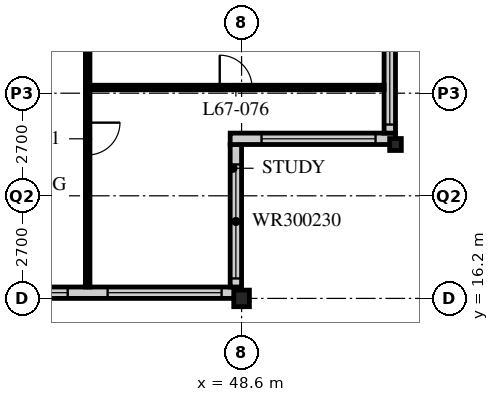
"""IFC4 building model, lengths in metres.
Left out: names, types, materials, properties, quantities, classifications, styles, units other than length and angle.
Written with IfcOpenShell. Run it as: python <this file> out.ifc"""

import sys

from ifc_helpers import new_model, si_unit, direction, frame, frame_2d, origin, origin_2d, place, context, subcontext, project, spatial, rectangle, i_section, extrude, element, fill, save


model = new_model("IFC4")
c1 = context("Model", 3, precision=1e-05, world=origin(), true_north=direction((0.0, 1.0)))
c2 = subcontext(c1, "Body", "Model", "MODEL_VIEW")
j1 = project(units=[si_unit("LENGTHUNIT", "METRE"), si_unit("PLANEANGLEUNIT", "RADIAN")], contexts=[c1])
p1 = place(None, origin())
s1 = spatial("IfcSite", under=j1, at=p1, CompositionType="ELEMENT")
p2 = place(p1, origin())
s2 = spatial("IfcBuilding", under=s1, at=p2, CompositionType="ELEMENT")
p3 = place(p2, frame((0.0, 0.0, 261.9)))
s3 = spatial("IfcBuildingStorey", under=s2, at=p3, CompositionType="ELEMENT", Elevation=261.9)
p4 = place(p3, frame((48.6, 16.2, 0.0), z_axis=(0.0, 0.0, 1.0), x_axis=(1.0, 0.0, 0.0)))
e1 = element("IfcColumn", 1, at=p4, inside=s3, PredefinedType="COLUMN", context=c2, shape_type="SweptSolid", body=[
    extrude(i_section(OverallWidth=0.412, OverallDepth=0.437, WebThickness=0.036, FlangeThickness=0.058, FilletRadius=0.015, at=origin_2d()), origin(), (0.0, 0.0, 1.0), 3.9),
])
p5 = place(p3, frame((52.65, 20.25, 0.0), z_axis=(0.0, 0.0, 1.0), x_axis=(1.0, 0.0, 0.0)))
e2 = element("IfcColumn", 2, at=p5, inside=s3, PredefinedType="COLUMN", context=c2, shape_type="SweptSolid", body=[
    extrude(i_section(OverallWidth=0.307, OverallDepth=0.314, WebThickness=0.012, FlangeThickness=0.019, FilletRadius=0.015, at=origin_2d()), origin(), (0.0, 0.0, 1.0), 3.9),
])
p6 = place(p3, frame((8.4, 16.35, 0.0), z_axis=(0.0, 0.0, 1.0), x_axis=(1.0, 0.0, 0.0)))
e3 = element("IfcWall", 3, at=p6, inside=s3, PredefinedType="SOLIDWALL", context=c2, shape_type="SweptSolid", body=[
    extrude(rectangle(XDim=40.2, YDim=0.3, at=frame_2d((20.1, 0.0))), origin(), (0.0, 0.0, 1.0), 3.69),
])
p7 = place(p6, frame((0.225, 0.0, 0.6)))
e4 = element("IfcOpeningElement", 4, at=p7, cuts=e3, PredefinedType="OPENING", context=c2, shape_type="SweptSolid", body=[
    extrude(rectangle(XDim=3.0, YDim=2.4, at=frame_2d((1.5, 1.2))), frame((0.0, 0.16, 0.0), z_axis=(0.0, -1.0, 0.0), x_axis=(1.0, 0.0, 0.0)), (0.0, 0.0, 1.0), 0.32),
])
p8 = place(p6, frame((4.275, 0.0, 0.6)))
e5 = element("IfcOpeningElement", 5, at=p8, cuts=e3, PredefinedType="OPENING", context=c2, shape_type="SweptSolid", body=[
    extrude(rectangle(XDim=3.0, YDim=2.4, at=frame_2d((1.5, 1.2))), frame((0.0, 0.16, 0.0), z_axis=(0.0, -1.0, 0.0), x_axis=(1.0, 0.0, 0.0)), (0.0, 0.0, 1.0), 0.32),
])
p9 = place(p6, frame((8.325, 0.0, 0.6)))
e6 = element("IfcOpeningElement", 6, at=p9, cuts=e3, PredefinedType="OPENING", context=c2, shape_type="SweptSolid", body=[
    extrude(rectangle(XDim=3.0, YDim=2.4, at=frame_2d((1.5, 1.2))), frame((0.0, 0.16, 0.0), z_axis=(0.0, -1.0, 0.0), x_axis=(1.0, 0.0, 0.0)), (0.0, 0.0, 1.0), 0.32),
])
p10 = place(p6, frame((12.375, 0.0, 0.6)))
e7 = element("IfcOpeningElement", 7, at=p10, cuts=e3, PredefinedType="OPENING", context=c2, shape_type="SweptSolid", body=[
    extrude(rectangle(XDim=3.0, YDim=2.4, at=frame_2d((1.5, 1.2))), frame((0.0, 0.16, 0.0), z_axis=(0.0, -1.0, 0.0), x_axis=(1.0, 0.0, 0.0)), (0.0, 0.0, 1.0), 0.32),
])
p11 = place(p6, frame((16.425, 0.0, 0.6)))
e8 = element("IfcOpeningElement", 8, at=p11, cuts=e3, PredefinedType="OPENING", context=c2, shape_type="SweptSolid", body=[
    extrude(rectangle(XDim=3.0, YDim=2.4, at=frame_2d((1.5, 1.2))), frame((0.0, 0.16, 0.0), z_axis=(0.0, -1.0, 0.0), x_axis=(1.0, 0.0, 0.0)), (0.0, 0.0, 1.0), 0.32),
])
p12 = place(p6, frame((20.475, 0.0, 0.6)))
e9 = element("IfcOpeningElement", 9, at=p12, cuts=e3, PredefinedType="OPENING", context=c2, shape_type="SweptSolid", body=[
    extrude(rectangle(XDim=3.0, YDim=2.4, at=frame_2d((1.5, 1.2))), frame((0.0, 0.16, 0.0), z_axis=(0.0, -1.0, 0.0), x_axis=(1.0, 0.0, 0.0)), (0.0, 0.0, 1.0), 0.32),
])
p13 = place(p6, frame((24.525, 0.0, 0.6)))
e10 = element("IfcOpeningElement", 10, at=p13, cuts=e3, PredefinedType="OPENING", context=c2, shape_type="SweptSolid", body=[
    extrude(rectangle(XDim=3.0, YDim=2.4, at=frame_2d((1.5, 1.2))), frame((0.0, 0.16, 0.0), z_axis=(0.0, -1.0, 0.0), x_axis=(1.0, 0.0, 0.0)), (0.0, 0.0, 1.0), 0.32),
])
p14 = place(p6, frame((28.575, 0.0, 0.6)))
e11 = element("IfcOpeningElement", 11, at=p14, cuts=e3, PredefinedType="OPENING", context=c2, shape_type="SweptSolid", body=[
    extrude(rectangle(XDim=3.0, YDim=2.4, at=frame_2d((1.5, 1.2))), frame((0.0, 0.16, 0.0), z_axis=(0.0, -1.0, 0.0), x_axis=(1.0, 0.0, 0.0)), (0.0, 0.0, 1.0), 0.32),
])
p15 = place(p6, frame((32.625, 0.0, 0.6)))
e12 = element("IfcOpeningElement", 12, at=p15, cuts=e3, PredefinedType="OPENING", context=c2, shape_type="SweptSolid", body=[
    extrude(rectangle(XDim=3.0, YDim=2.4, at=frame_2d((1.5, 1.2))), frame((0.0, 0.16, 0.0), z_axis=(0.0, -1.0, 0.0), x_axis=(1.0, 0.0, 0.0)), (0.0, 0.0, 1.0), 0.32),
])
p16 = place(p6, frame((36.675, 0.0, 0.6)))
e13 = element("IfcOpeningElement", 13, at=p16, cuts=e3, PredefinedType="OPENING", context=c2, shape_type="SweptSolid", body=[
    extrude(rectangle(XDim=3.0, YDim=2.4, at=frame_2d((1.5, 1.2))), frame((0.0, 0.16, 0.0), z_axis=(0.0, -1.0, 0.0), x_axis=(1.0, 0.0, 0.0)), (0.0, 0.0, 1.0), 0.32),
])
p17 = place(p3, frame((48.45, 16.5, 0.0), z_axis=(0.0, 0.0, 1.0), x_axis=(0.0, 1.0, 0.0)))
e14 = element("IfcWall", 14, at=p17, inside=s3, PredefinedType="SOLIDWALL", context=c2, shape_type="SweptSolid", body=[
    extrude(rectangle(XDim=3.75, YDim=0.3, at=frame_2d((1.875, 0.0))), origin(), (0.0, 0.0, 1.0), 3.69),
])
p18 = place(p17, frame((0.225, 0.0, 0.6)))
e15 = element("IfcOpeningElement", 15, at=p18, cuts=e14, PredefinedType="OPENING", context=c2, shape_type="SweptSolid", body=[
    extrude(rectangle(XDim=3.0, YDim=2.3, at=frame_2d((1.5, 1.15))), frame((0.0, 0.16, 0.0), z_axis=(0.0, -1.0, 0.0), x_axis=(1.0, 0.0, 0.0)), (0.0, 0.0, 1.0), 0.32),
])
p19 = place(p3, frame((48.3, 20.4, 0.0), z_axis=(0.0, 0.0, 1.0), x_axis=(1.0, 0.0, 0.0)))
e16 = element("IfcWall", 16, at=p19, inside=s3, PredefinedType="SOLIDWALL", context=c2, shape_type="SweptSolid", body=[
    extrude(rectangle(XDim=4.35, YDim=0.3, at=frame_2d((2.175, 0.0))), origin(), (0.0, 0.0, 1.0), 3.69),
])
p20 = place(p19, frame((0.825, 0.0, 0.6)))
e17 = element("IfcOpeningElement", 17, at=p20, cuts=e16, PredefinedType="OPENING", context=c2, shape_type="SweptSolid", body=[
    extrude(rectangle(XDim=3.0, YDim=2.3, at=frame_2d((1.5, 1.15))), frame((0.0, 0.16, 0.0), z_axis=(0.0, -1.0, 0.0), x_axis=(1.0, 0.0, 0.0)), (0.0, 0.0, 1.0), 0.32),
])
p21 = place(p3, frame((52.5, 20.55, 0.0), z_axis=(0.0, 0.0, 1.0), x_axis=(0.0, 1.0, 0.0)))
e18 = element("IfcWall", 18, at=p21, inside=s3, PredefinedType="SOLIDWALL", context=c2, shape_type="SweptSolid", body=[
    extrude(rectangle(XDim=3.75, YDim=0.3, at=frame_2d((1.875, 0.0))), origin(), (0.0, 0.0, 1.0), 3.69),
])
p22 = place(p21, frame((0.225, 0.0, 0.6)))
e19 = element("IfcOpeningElement", 19, at=p22, cuts=e18, PredefinedType="OPENING", context=c2, shape_type="SweptSolid", body=[
    extrude(rectangle(XDim=3.0, YDim=2.3, at=frame_2d((1.5, 1.15))), frame((0.0, 0.16, 0.0), z_axis=(0.0, -1.0, 0.0), x_axis=(1.0, 0.0, 0.0)), (0.0, 0.0, 1.0), 0.32),
])
p23 = place(p3, frame((44.55, 16.5, 0.0), z_axis=(0.0, 0.0, 1.0), x_axis=(0.0, 1.0, 0.0)))
e20 = element("IfcWall", 20, at=p23, inside=s3, PredefinedType="PARTITIONING", context=c2, shape_type="SweptSolid", body=[
    extrude(rectangle(XDim=7.8, YDim=0.12, at=frame_2d((3.9, 0.0))), origin(), (0.0, 0.0, 1.0), 3.69),
])
p24 = place(p23, frame((3.475, 0.0, 0.0)))
e21 = element("IfcOpeningElement", 21, at=p24, cuts=e20, PredefinedType="OPENING", context=c2, shape_type="SweptSolid", body=[
    extrude(rectangle(XDim=0.85, YDim=2.1, at=frame_2d((0.425, 1.05))), frame((0.0, 0.07, 0.0), z_axis=(0.0, -1.0, 0.0), x_axis=(1.0, 0.0, 0.0)), (0.0, 0.0, 1.0), 0.14),
])
p25 = place(p3, frame((44.55, 21.75, 0.0), z_axis=(0.0, 0.0, 1.0), x_axis=(1.0, 0.0, 0.0)))
e22 = element("IfcWall", 22, at=p25, inside=s3, PredefinedType="PARTITIONING", context=c2, shape_type="SweptSolid", body=[
    extrude(rectangle(XDim=7.8, YDim=0.12, at=frame_2d((3.9, 0.0))), origin(), (0.0, 0.0, 1.0), 3.69),
])
p26 = place(p25, frame((3.475, 0.0, 0.0)))
e23 = element("IfcOpeningElement", 23, at=p26, cuts=e22, PredefinedType="OPENING", context=c2, shape_type="SweptSolid", body=[
    extrude(rectangle(XDim=0.85, YDim=2.1, at=frame_2d((0.425, 1.05))), frame((0.0, 0.07, 0.0), z_axis=(0.0, -1.0, 0.0), x_axis=(1.0, 0.0, 0.0)), (0.0, 0.0, 1.0), 0.14),
])
p27 = place(p15, origin())
e24 = element("IfcWindow", 24, at=p27, inside=s3, PartitioningType="SINGLE_PANEL", PredefinedType="WINDOW", context=c2, shape_type="SweptSolid", body=[
    extrude(rectangle(XDim=3.0, YDim=2.4, at=frame_2d((1.5, 1.2))), frame((0.0, 0.03, 0.0), z_axis=(0.0, -1.0, 0.0), x_axis=(1.0, 0.0, 0.0)), (0.0, 0.0, 1.0), 0.06),
])
fill(e12, e24)
p28 = place(p16, origin())
e25 = element("IfcWindow", 25, at=p28, inside=s3, PartitioningType="SINGLE_PANEL", PredefinedType="WINDOW", context=c2, shape_type="SweptSolid", body=[
    extrude(rectangle(XDim=3.0, YDim=2.4, at=frame_2d((1.5, 1.2))), frame((0.0, 0.03, 0.0), z_axis=(0.0, -1.0, 0.0), x_axis=(1.0, 0.0, 0.0)), (0.0, 0.0, 1.0), 0.06),
])
fill(e13, e25)
p29 = place(p18, origin())
e26 = element("IfcWindow", 26, at=p29, inside=s3, PartitioningType="SINGLE_PANEL", PredefinedType="WINDOW", context=c2, shape_type="SweptSolid", body=[
    extrude(rectangle(XDim=3.0, YDim=2.3, at=frame_2d((1.5, 1.15))), frame((0.0, 0.03, 0.0), z_axis=(0.0, -1.0, 0.0), x_axis=(1.0, 0.0, 0.0)), (0.0, 0.0, 1.0), 0.06),
])
fill(e15, e26)
p30 = place(p20, origin())
e27 = element("IfcWindow", 27, at=p30, inside=s3, PartitioningType="SINGLE_PANEL", PredefinedType="WINDOW", context=c2, shape_type="SweptSolid", body=[
    extrude(rectangle(XDim=3.0, YDim=2.3, at=frame_2d((1.5, 1.15))), frame((0.0, 0.03, 0.0), z_axis=(0.0, -1.0, 0.0), x_axis=(1.0, 0.0, 0.0)), (0.0, 0.0, 1.0), 0.06),
])
fill(e17, e27)
p31 = place(p22, origin())
e28 = element("IfcWindow", 28, at=p31, inside=s3, PartitioningType="SINGLE_PANEL", PredefinedType="WINDOW", context=c2, shape_type="SweptSolid", body=[
    extrude(rectangle(XDim=3.0, YDim=2.3, at=frame_2d((1.5, 1.15))), frame((0.0, 0.03, 0.0), z_axis=(0.0, -1.0, 0.0), x_axis=(1.0, 0.0, 0.0)), (0.0, 0.0, 1.0), 0.06),
])
fill(e19, e28)
p32 = place(p24, origin())
e29 = element("IfcDoor", 29, at=p32, inside=s3, OperationType="SINGLE_SWING_LEFT", PredefinedType="DOOR", context=c2, shape_type="SweptSolid", body=[
    extrude(rectangle(XDim=0.85, YDim=2.1, at=frame_2d((0.425, 1.05))), frame((0.0, 0.025, 0.0), z_axis=(0.0, -1.0, 0.0), x_axis=(1.0, 0.0, 0.0)), (0.0, 0.0, 1.0), 0.05),
])
fill(e21, e29)
p33 = place(p26, origin())
e30 = element("IfcDoor", 30, at=p33, inside=s3, OperationType="SINGLE_SWING_LEFT", PredefinedType="DOOR", context=c2, shape_type="SweptSolid", body=[
    extrude(rectangle(XDim=0.85, YDim=2.1, at=frame_2d((0.425, 1.05))), frame((0.0, 0.025, 0.0), z_axis=(0.0, -1.0, 0.0), x_axis=(1.0, 0.0, 0.0)), (0.0, 0.0, 1.0), 0.05),
])
fill(e23, e30)
save(model, sys.argv[1])
